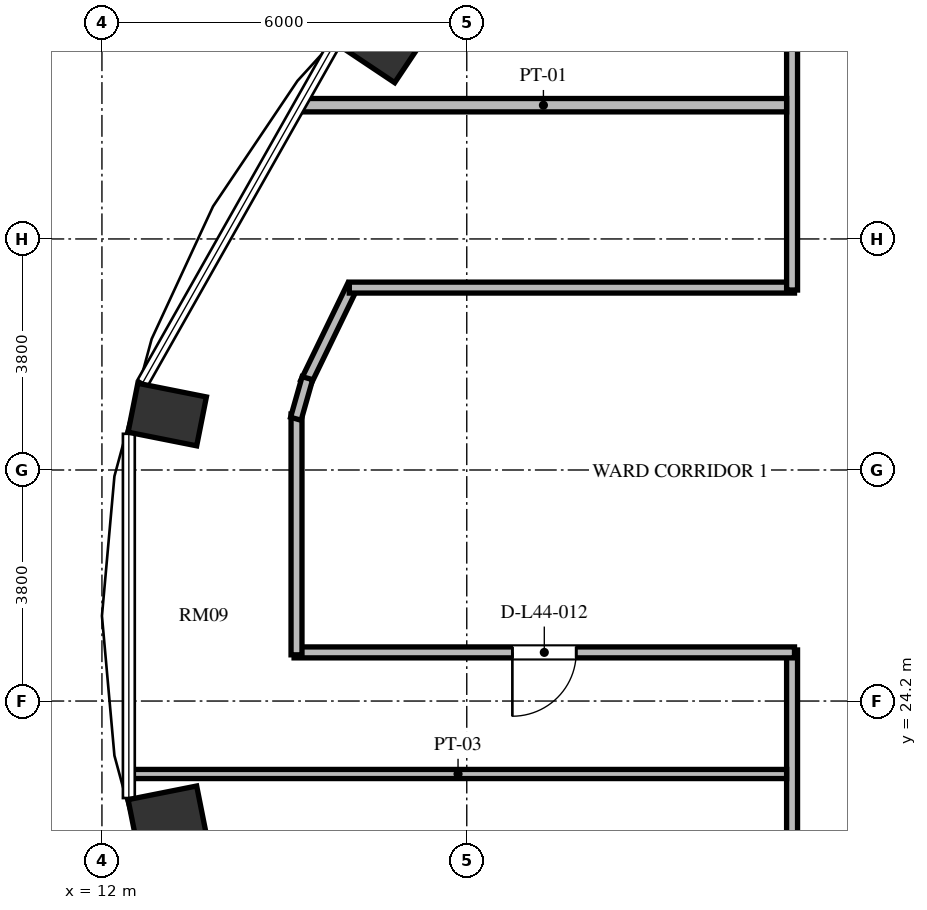
"""IFC4 building model, lengths in metres.
Left out: names, types, materials, properties, quantities, classifications, styles, units other than length and angle.
Written with IfcOpenShell. Run it as: python <this file> out.ifc"""

import sys

from ifc_helpers import new_model, si_unit, direction, frame, frame_2d, origin, origin_2d, place, context, subcontext, project, spatial, rectangle, extrude, element, fill, save


model = new_model("IFC4")
c1 = context("Model", 3, precision=1e-05, world=origin(), true_north=direction((0.0, 1.0)))
c2 = subcontext(c1, "Body", "Model", "MODEL_VIEW")
j1 = project(units=[si_unit("LENGTHUNIT", "METRE"), si_unit("PLANEANGLEUNIT", "RADIAN")], contexts=[c1])
p1 = place(None, origin())
s1 = spatial("IfcSite", under=j1, at=p1, CompositionType="ELEMENT")
p2 = place(p1, origin())
s2 = spatial("IfcBuilding", under=s1, at=p2, CompositionType="ELEMENT")
p3 = place(p2, frame((0.0, 0.0, 171.12)))
s3 = spatial("IfcBuildingStorey", under=s2, at=p3, CompositionType="ELEMENT", Elevation=171.12)
for number, where, z_axis, x_axis in (
    (1, (16.564, 35.031, 0.0), (0.0, 0.0, 1.0), (-0.831, 0.556, 0.0)),
    (2, (13.074, 28.912, 0.0), (0.0, 0.0, 1.0), (-0.981, 0.195, 0.0)),
    (3, (13.074, 22.288, 0.0), (0.0, 0.0, 1.0), (-0.981, -0.195, 0.0)),
):
    element("IfcColumn", number, at=place(p3, frame(where, z_axis=z_axis, x_axis=x_axis)), inside=s3, PredefinedType="COLUMN", context=c2, shape_type="SweptSolid", body=[
        extrude(rectangle(XDim=1.15, YDim=0.82, at=origin_2d()), origin(), (0.0, 0.0, 1.0), 3.648),
    ])
p4 = place(p3, frame((15.35, 29.436, 0.0), z_axis=(0.0, 0.0, 1.0), x_axis=(0.436196025907, 0.899851669434, 0.0)))
e4 = element("IfcWall", 4, at=p4, inside=s3, PredefinedType="PARTITIONING", context=c2, shape_type="SweptSolid", body=[
    extrude(rectangle(XDim=1.778, YDim=0.18, at=frame_2d((0.889, 0.0))), origin(), (0.0, 0.0, 1.0), 3.428),
])
p5 = place(p3, frame((16.068, 31.0, 0.0), z_axis=(0.0, 0.0, 1.0), x_axis=(1.0, 0.0, 0.0)))
e5 = element("IfcWall", 5, at=p5, inside=s3, PredefinedType="PARTITIONING", context=c2, shape_type="SweptSolid", body=[
    extrude(rectangle(XDim=7.322, YDim=0.18, at=frame_2d((3.661, 0.0))), origin(), (0.0, 0.0, 1.0), 3.428),
])
p6 = place(p3, frame((23.35, 30.96, 0.0), z_axis=(0.0, 0.0, 1.0), x_axis=(0.0, 1.0, 0.0)))
e6 = element("IfcWall", 6, at=p6, inside=s3, PredefinedType="PARTITIONING", context=c2, shape_type="SweptSolid", body=[
    extrude(rectangle(XDim=6.714, YDim=0.18, at=frame_2d((3.357, 0.0))), origin(), (0.0, 0.0, 1.0), 3.428),
])
p7 = place(p3, frame((23.35, 19.98, 0.0), z_axis=(0.0, 0.0, 1.0), x_axis=(0.0, 1.0, 0.0)))
e7 = element("IfcWall", 7, at=p7, inside=s3, PredefinedType="PARTITIONING", context=c2, shape_type="SweptSolid", body=[
    extrude(rectangle(XDim=5.06, YDim=0.18, at=frame_2d((2.53, 0.0))), origin(), (0.0, 0.0, 1.0), 3.428),
])
p8 = place(p3, frame((23.39, 25.0, 0.0), z_axis=(0.0, 0.0, 1.0), x_axis=(-1.0, 0.0, 0.0)))
e8 = element("IfcWall", 8, at=p8, inside=s3, PredefinedType="PARTITIONING", context=c2, shape_type="SweptSolid", body=[
    extrude(rectangle(XDim=8.23, YDim=0.18, at=frame_2d((4.115, 0.0))), origin(), (0.0, 0.0, 1.0), 3.428),
])
p9 = place(p8, frame((3.59, 0.0, 0.0)))
e9 = element("IfcOpeningElement", 9, at=p9, cuts=e8, PredefinedType="OPENING", context=c2, shape_type="SweptSolid", body=[
    extrude(rectangle(XDim=1.05, YDim=2.15, at=frame_2d((0.525, 1.075))), frame((0.0, 0.1, 0.0), z_axis=(0.0, -1.0, 0.0), x_axis=(1.0, 0.0, 0.0)), (0.0, 0.0, 1.0), 0.2),
])
p10 = place(p3, frame((15.2, 24.96, 0.0), z_axis=(0.0, 0.0, 1.0), x_axis=(0.0, 1.0, 0.0)))
e10 = element("IfcWall", 10, at=p10, inside=s3, PredefinedType="PARTITIONING", context=c2, shape_type="SweptSolid", body=[
    extrude(rectangle(XDim=3.961, YDim=0.18, at=frame_2d((1.98, 0.0))), origin(), (0.0, 0.0, 1.0), 3.428),
])
p11 = place(p3, frame((15.189, 28.843, 0.0), z_axis=(0.0, 0.0, 1.0), x_axis=(0.272862960331, 0.962052911684, 0.0)))
e11 = element("IfcWall", 11, at=p11, inside=s3, PredefinedType="PARTITIONING", context=c2, shape_type="SweptSolid", body=[
    extrude(rectangle(XDim=0.694, YDim=0.18, at=frame_2d((0.347, 0.0))), origin(), (0.0, 0.0, 1.0), 3.428),
])
p12 = place(p3, frame((12.453, 23.0, 0.0), z_axis=(0.0, 0.0, 1.0), x_axis=(1.0, 0.0, 0.0)))
e12 = element("IfcWall", 12, at=p12, inside=s3, PredefinedType="PARTITIONING", context=c2, shape_type="SweptSolid", body=[
    extrude(rectangle(XDim=10.807, YDim=0.15, at=frame_2d((5.404, 0.0))), origin(), (0.0, 0.0, 1.0), 3.428),
])
p13 = place(p3, frame((15.261, 34.0, 0.0), z_axis=(0.0, 0.0, 1.0), x_axis=(1.0, 0.0, 0.0)))
e13 = element("IfcWall", 13, at=p13, inside=s3, PredefinedType="PARTITIONING", context=c2, shape_type="SweptSolid", body=[
    extrude(rectangle(XDim=7.999, YDim=0.22, at=frame_2d((4.0, 0.0))), origin(), (0.0, 0.0, 1.0), 3.428),
])
p14 = place(p9, origin())
e14 = element("IfcDoor", 14, at=p14, inside=s3, OperationType="SINGLE_SWING_RIGHT", PredefinedType="DOOR", context=c2, shape_type="SweptSolid", body=[
    extrude(rectangle(XDim=1.05, YDim=2.15, at=frame_2d((0.525, 1.075))), frame((0.0, 0.025, 0.0), z_axis=(0.0, -1.0, 0.0), x_axis=(1.0, 0.0, 0.0)), (0.0, 0.0, 1.0), 0.05),
])
fill(e9, e14)
save(model, sys.argv[1])
